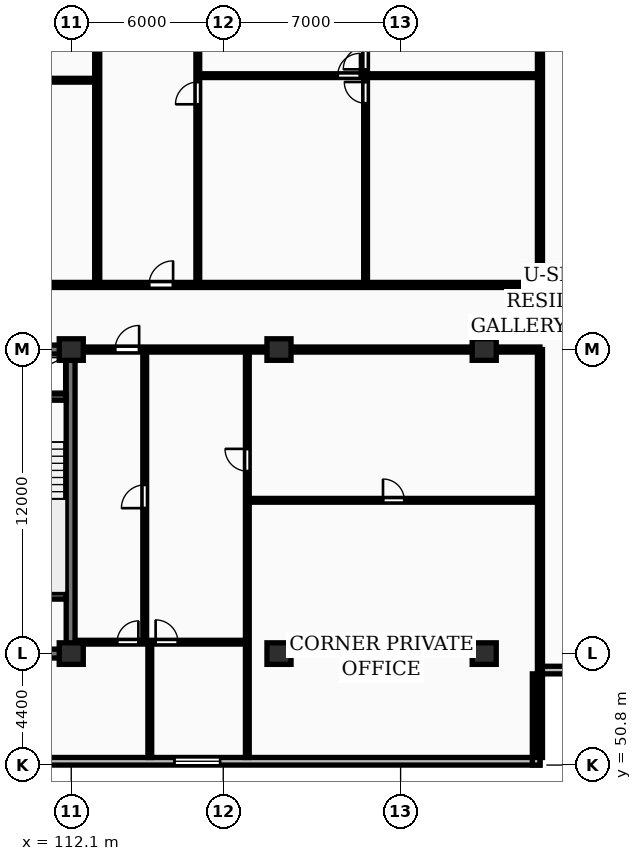
"""IFC4 building model, lengths in metres.
Left out: names, types, materials, properties, quantities, classifications, styles, units other than length and angle.
Written with IfcOpenShell. Run it as: python <this file> out.ifc"""

import sys

from ifc_helpers import new_model, si_unit, direction, frame, frame_2d, origin, origin_2d, place, context, subcontext, project, spatial, rectangle, extrude, element, fill, save


model = new_model("IFC4")
c1 = context("Model", 3, precision=1e-05, world=origin(), true_north=direction((0.0, 1.0)))
c2 = subcontext(c1, "Body", "Model", "MODEL_VIEW")
j1 = project(units=[si_unit("LENGTHUNIT", "METRE"), si_unit("PLANEANGLEUNIT", "RADIAN")], contexts=[c1])
p1 = place(None, origin())
s1 = spatial("IfcSite", under=j1, at=p1, CompositionType="ELEMENT")
p2 = place(p1, origin())
s2 = spatial("IfcBuilding", under=s1, at=p2, CompositionType="ELEMENT")
p3 = place(p2, frame((0.0, 0.0, 126.3)))
s3 = spatial("IfcBuildingStorey", under=s2, at=p3, CompositionType="ELEMENT", Elevation=126.3)
for number, where, z_axis, x_axis in (
    (1, (112.1, 55.2, 0.0), (0.0, 0.0, 1.0), (1.0, 0.0, 0.0)),
    (2, (112.1, 67.2, 0.0), (0.0, 0.0, 1.0), (1.0, 0.0, 0.0)),
    (3, (120.3, 55.2, 0.0), (0.0, 0.0, 1.0), (1.0, 0.0, 0.0)),
    (4, (120.3, 67.2, 0.0), (0.0, 0.0, 1.0), (1.0, 0.0, 0.0)),
    (5, (128.4, 55.2, 0.0), (0.0, 0.0, 1.0), (1.0, 0.0, 0.0)),
    (6, (128.4, 67.2, 0.0), (0.0, 0.0, 1.0), (1.0, 0.0, 0.0)),
):
    element("IfcColumn", number, at=place(p3, frame(where, z_axis=z_axis, x_axis=x_axis)), inside=s3, PredefinedType="COLUMN", context=c2, shape_type="SweptSolid", body=[
        extrude(rectangle(XDim=0.95, YDim=0.85, at=origin_2d()), origin(), (0.0, 0.0, 1.0), 3.25),
    ])
p4 = place(p3, frame((57.6, 50.95, 0.0), z_axis=(0.0, 0.0, 1.0), x_axis=(1.0, 0.0, 0.0)))
e7 = element("IfcWall", 7, at=p4, inside=s3, PredefinedType="STANDARD", context=c2, shape_type="SweptSolid", body=[
    extrude(rectangle(XDim=73.0, YDim=0.3, at=frame_2d((36.5, 0.0))), origin(), (0.0, 0.0, 1.0), 2.97),
])
p5 = place(p4, frame((15.225, 0.0, 0.85)))
e8 = element("IfcOpeningElement", 8, at=p5, cuts=e7, PredefinedType="OPENING", context=c2, shape_type="SweptSolid", body=[
    extrude(rectangle(XDim=1.8, YDim=1.8, at=frame_2d((0.9, 0.9))), frame((0.0, 0.16, 0.0), z_axis=(0.0, -1.0, 0.0), x_axis=(1.0, 0.0, 0.0)), (0.0, 0.0, 1.0), 0.32),
])
p6 = place(p4, frame((58.575, 0.0, 0.85)))
e9 = element("IfcOpeningElement", 9, at=p6, cuts=e7, PredefinedType="OPENING", context=c2, shape_type="SweptSolid", body=[
    extrude(rectangle(XDim=1.8, YDim=1.8, at=frame_2d((0.9, 0.9))), frame((0.0, 0.16, 0.0), z_axis=(0.0, -1.0, 0.0), x_axis=(1.0, 0.0, 0.0)), (0.0, 0.0, 1.0), 0.32),
])
for number, where, z_axis, x_axis in (
    (10, (130.45, 50.8, 0.0), (0.0, 0.0, 1.0), (0.0, 1.0, 0.0)),
    (11, (130.6, 54.55, 0.0), (0.0, 0.0, 1.0), (1.0, 0.0, 0.0)),
):
    element("IfcWall", number, at=place(p3, frame(where, z_axis=z_axis, x_axis=x_axis)), inside=s3, PredefinedType="STANDARD", context=c2, shape_type="SweptSolid", body=[
        extrude(rectangle(XDim=3.6, YDim=0.3, at=frame_2d((1.8, 0.0))), origin(), (0.0, 0.0, 1.0), 2.97),
    ])
p7 = place(p3, frame((75.95, 55.2, 0.0), z_axis=(0.0, 0.0, 1.0), x_axis=(1.0, 0.0, 0.0)))
e12 = element("IfcWall", 12, at=p7, inside=s3, PredefinedType="SHEAR", context=c2, shape_type="SweptSolid", body=[
    extrude(rectangle(XDim=36.3, YDim=0.35, at=frame_2d((18.15, 0.0))), origin(), (0.0, 0.0, 1.0), 3.25),
])
p8 = place(p3, frame((112.075, 55.375, 0.0), z_axis=(0.0, 0.0, 1.0), x_axis=(0.0, 1.0, 0.0)))
e13 = element("IfcWall", 13, at=p8, inside=s3, PredefinedType="SHEAR", context=c2, shape_type="SweptSolid", body=[
    extrude(rectangle(XDim=11.65, YDim=0.35, at=frame_2d((5.825, 0.0))), origin(), (0.0, 0.0, 1.0), 3.25),
])
p9 = place(p3, frame((75.95, 67.2, 0.0), z_axis=(0.0, 0.0, 1.0), x_axis=(1.0, 0.0, 0.0)))
e14 = element("IfcWall", 14, at=p9, inside=s3, PredefinedType="SHEAR", context=c2, shape_type="SweptSolid", body=[
    extrude(rectangle(XDim=36.3, YDim=0.35, at=frame_2d((18.15, 0.0))), origin(), (0.0, 0.0, 1.0), 3.25),
])
p10 = place(p9, frame((5.25, 0.0, 0.0)))
e15 = element("IfcOpeningElement", 15, at=p10, cuts=e14, PredefinedType="OPENING", context=c2, shape_type="SweptSolid", body=[
    extrude(rectangle(XDim=1.0, YDim=2.15, at=frame_2d((0.5, 1.075))), frame((0.0, 0.185, 0.0), z_axis=(0.0, -1.0, 0.0), x_axis=(1.0, 0.0, 0.0)), (0.0, 0.0, 1.0), 0.37),
])
p11 = place(p9, frame((21.6, 0.0, 0.0)))
e16 = element("IfcOpeningElement", 16, at=p11, cuts=e14, PredefinedType="OPENING", context=c2, shape_type="SweptSolid", body=[
    extrude(rectangle(XDim=1.5, YDim=2.2, at=frame_2d((0.75, 1.1))), frame((0.0, 0.185, 0.0), z_axis=(0.0, -1.0, 0.0), x_axis=(1.0, 0.0, 0.0)), (0.0, 0.0, 1.0), 0.37),
])
p12 = place(p9, frame((30.45, 0.0, 0.0)))
e17 = element("IfcOpeningElement", 17, at=p12, cuts=e14, PredefinedType="OPENING", context=c2, shape_type="SweptSolid", body=[
    extrude(rectangle(XDim=1.0, YDim=2.15, at=frame_2d((0.5, 1.075))), frame((0.0, 0.185, 0.0), z_axis=(0.0, -1.0, 0.0), x_axis=(1.0, 0.0, 0.0)), (0.0, 0.0, 1.0), 0.37),
])
for number, where, z_axis, x_axis in (
    (18, (108.66, 57.475, 0.0), (0.0, 0.0, 1.0), (1.0, 0.0, 0.0)),
    (19, (108.66, 65.325, 0.0), (0.0, 0.0, 1.0), (1.0, 0.0, 0.0)),
):
    element("IfcWall", number, at=place(p3, frame(where, z_axis=z_axis, x_axis=x_axis)), inside=s3, PredefinedType="SHEAR", context=c2, shape_type="SweptSolid", body=[
        extrude(rectangle(XDim=3.24, YDim=0.25, at=frame_2d((1.62, 0.0))), origin(), (0.0, 0.0, 1.0), 3.25),
    ])
p13 = place(p3, frame((130.6, 51.1, 0.0), z_axis=(0.0, 0.0, 1.0), x_axis=(0.0, 1.0, 0.0)))
e20 = element("IfcWall", 20, at=p13, inside=s3, PredefinedType="PARTITIONING", context=c2, shape_type="SweptSolid", body=[
    extrude(rectangle(XDim=16.1, YDim=0.2, at=frame_2d((8.05, 0.0))), origin(), (0.0, 0.0, 1.0), 2.97),
])
p14 = place(p3, frame((119.05, 61.25, 0.0), z_axis=(0.0, 0.0, 1.0), x_axis=(1.0, 0.0, 0.0)))
e21 = element("IfcWall", 21, at=p14, inside=s3, PredefinedType="PARTITIONING", context=c2, shape_type="SweptSolid", body=[
    extrude(rectangle(XDim=11.55, YDim=0.15, at=frame_2d((5.775, 0.0))), origin(), (0.0, 0.0, 1.0), 2.97),
])
p15 = place(p14, frame((5.355, 0.0, 0.0)))
e22 = element("IfcOpeningElement", 22, at=p15, cuts=e21, PredefinedType="OPENING", context=c2, shape_type="SweptSolid", body=[
    extrude(rectangle(XDim=0.84, YDim=2.04, at=frame_2d((0.42, 1.02))), frame((0.0, 0.085, 0.0), z_axis=(0.0, -1.0, 0.0), x_axis=(1.0, 0.0, 0.0)), (0.0, 0.0, 1.0), 0.17),
])
p16 = place(p3, frame((119.05, 51.1, 0.0), z_axis=(0.0, 0.0, 1.0), x_axis=(0.0, 1.0, 0.0)))
e23 = element("IfcWall", 23, at=p16, inside=s3, PredefinedType="PARTITIONING", context=c2, shape_type="SweptSolid", body=[
    extrude(rectangle(XDim=16.05, YDim=0.15, at=frame_2d((8.025, 0.0))), origin(), (0.0, 0.0, 1.0), 2.97),
])
p17 = place(p16, frame((11.3, 0.0, 0.0)))
e24 = element("IfcOpeningElement", 24, at=p17, cuts=e23, PredefinedType="OPENING", context=c2, shape_type="SweptSolid", body=[
    extrude(rectangle(XDim=0.88, YDim=2.06, at=frame_2d((0.44, 1.03))), frame((0.0, 0.085, 0.0), z_axis=(0.0, -1.0, 0.0), x_axis=(1.0, 0.0, 0.0)), (0.0, 0.0, 1.0), 0.17),
])
p18 = place(p3, frame((115.0, 55.65, 0.0), z_axis=(0.0, 0.0, 1.0), x_axis=(0.0, 1.0, 0.0)))
e25 = element("IfcWall", 25, at=p18, inside=s3, PredefinedType="PARTITIONING", context=c2, shape_type="SweptSolid", body=[
    extrude(rectangle(XDim=11.5, YDim=0.15, at=frame_2d((5.75, 0.0))), origin(), (0.0, 0.0, 1.0), 2.97),
])
p19 = place(p18, frame((5.29, 0.0, 0.0)))
e26 = element("IfcOpeningElement", 26, at=p19, cuts=e25, PredefinedType="OPENING", context=c2, shape_type="SweptSolid", body=[
    extrude(rectangle(XDim=0.92, YDim=2.08, at=frame_2d((0.46, 1.04))), frame((0.0, 0.085, 0.0), z_axis=(0.0, -1.0, 0.0), x_axis=(1.0, 0.0, 0.0)), (0.0, 0.0, 1.0), 0.17),
])
p20 = place(p3, frame((115.2, 51.1, 0.0), z_axis=(0.0, 0.0, 1.0), x_axis=(0.0, 1.0, 0.0)))
e27 = element("IfcWall", 27, at=p20, inside=s3, PredefinedType="PARTITIONING", context=c2, shape_type="SweptSolid", body=[
    extrude(rectangle(XDim=4.55, YDim=0.15, at=frame_2d((2.275, 0.0))), origin(), (0.0, 0.0, 1.0), 2.97),
])
p21 = place(p3, frame((112.27, 55.65, 0.0), z_axis=(0.0, 0.0, 1.0), x_axis=(1.0, 0.0, 0.0)))
e28 = element("IfcWall", 28, at=p21, inside=s3, PredefinedType="PARTITIONING", context=c2, shape_type="SweptSolid", body=[
    extrude(rectangle(XDim=6.76, YDim=0.15, at=frame_2d((3.38, 0.0))), origin(), (0.0, 0.0, 1.0), 2.97),
])
p22 = place(p21, frame((1.64, 0.0, 0.0)))
e29 = element("IfcOpeningElement", 29, at=p22, cuts=e28, PredefinedType="OPENING", context=c2, shape_type="SweptSolid", body=[
    extrude(rectangle(XDim=0.84, YDim=2.04, at=frame_2d((0.42, 1.02))), frame((0.0, 0.085, 0.0), z_axis=(0.0, -1.0, 0.0), x_axis=(1.0, 0.0, 0.0)), (0.0, 0.0, 1.0), 0.17),
])
p23 = place(p21, frame((3.16, 0.0, 0.0)))
e30 = element("IfcOpeningElement", 30, at=p23, cuts=e28, PredefinedType="OPENING", context=c2, shape_type="SweptSolid", body=[
    extrude(rectangle(XDim=0.88, YDim=2.06, at=frame_2d((0.44, 1.03))), frame((0.0, 0.085, 0.0), z_axis=(0.0, -1.0, 0.0), x_axis=(1.0, 0.0, 0.0)), (0.0, 0.0, 1.0), 0.17),
])
p24 = place(p3, frame((112.25, 67.2, 0.0), z_axis=(0.0, 0.0, 1.0), x_axis=(1.0, 0.0, 0.0)))
e31 = element("IfcWall", 31, at=p24, inside=s3, PredefinedType="PARTITIONING", context=c2, shape_type="SweptSolid", body=[
    extrude(rectangle(XDim=18.35, YDim=0.2, at=frame_2d((9.175, 0.0))), origin(), (0.0, 0.0, 1.0), 2.433),
])
p25 = place(p24, frame((1.58, 0.0, 0.0)))
e32 = element("IfcOpeningElement", 32, at=p25, cuts=e31, PredefinedType="OPENING", context=c2, shape_type="SweptSolid", body=[
    extrude(rectangle(XDim=0.95, YDim=2.15, at=frame_2d((0.475, 1.075))), frame((0.0, 0.11, 0.0), z_axis=(0.0, -1.0, 0.0), x_axis=(1.0, 0.0, 0.0)), (0.0, 0.0, 1.0), 0.22),
])
for number, where, z_axis, x_axis in (
    (33, (130.6, 69.83, 0.0), (0.0, 0.0, 1.0), (0.0, 1.0, 0.0)),
    (34, (113.125, 69.83, 0.0), (0.0, 0.0, 1.0), (0.0, 1.0, 0.0)),
):
    element("IfcWall", number, at=place(p3, frame(where, z_axis=z_axis, x_axis=x_axis)), inside=s3, PredefinedType="PARTITIONING", context=c2, shape_type="SweptSolid", body=[
        extrude(rectangle(XDim=26.07, YDim=0.2, at=frame_2d((13.035, 0.0))), origin(), (0.0, 0.0, 1.0), 2.97),
    ])
p26 = place(p3, frame((96.867, 77.83, 0.0), z_axis=(0.0, 0.0, 1.0), x_axis=(1.0, 0.0, 0.0)))
e35 = element("IfcWall", 35, at=p26, inside=s3, PredefinedType="PARTITIONING", context=c2, shape_type="SweptSolid", body=[
    extrude(rectangle(XDim=16.177, YDim=0.15, at=frame_2d((8.089, 0.0))), origin(), (0.0, 0.0, 1.0), 2.97),
])
p27 = place(p26, frame((3.45, 0.0, 0.0)))
e36 = element("IfcOpeningElement", 36, at=p27, cuts=e35, PredefinedType="OPENING", context=c2, shape_type="SweptSolid", body=[
    extrude(rectangle(XDim=0.88, YDim=2.06, at=frame_2d((0.44, 1.03))), frame((0.0, 0.085, 0.0), z_axis=(0.0, -1.0, 0.0), x_axis=(1.0, 0.0, 0.0)), (0.0, 0.0, 1.0), 0.17),
])
p28 = place(p3, frame((123.718, 69.81, 0.0), z_axis=(0.0, 0.0, 1.0), x_axis=(0.0, 1.0, 0.0)))
e37 = element("IfcWall", 37, at=p28, inside=s3, PredefinedType="PARTITIONING", context=c2, shape_type="SweptSolid", body=[
    extrude(rectangle(XDim=16.4, YDim=0.15, at=frame_2d((8.2, 0.0))), origin(), (0.0, 0.0, 1.0), 2.97),
])
p29 = place(p28, frame((7.11, 0.0, 0.0)))
e38 = element("IfcOpeningElement", 38, at=p29, cuts=e37, PredefinedType="OPENING", context=c2, shape_type="SweptSolid", body=[
    extrude(rectangle(XDim=0.84, YDim=2.04, at=frame_2d((0.42, 1.02))), frame((0.0, 0.085, 0.0), z_axis=(0.0, -1.0, 0.0), x_axis=(1.0, 0.0, 0.0)), (0.0, 0.0, 1.0), 0.17),
])
p30 = place(p28, frame((8.45, 0.0, 0.0)))
e39 = element("IfcOpeningElement", 39, at=p30, cuts=e37, PredefinedType="OPENING", context=c2, shape_type="SweptSolid", body=[
    extrude(rectangle(XDim=0.88, YDim=2.06, at=frame_2d((0.44, 1.03))), frame((0.0, 0.085, 0.0), z_axis=(0.0, -1.0, 0.0), x_axis=(1.0, 0.0, 0.0)), (0.0, 0.0, 1.0), 0.17),
])
p31 = place(p3, frame((117.155, 78.01, 0.0), z_axis=(0.0, 0.0, 1.0), x_axis=(1.0, 0.0, 0.0)))
e40 = element("IfcWall", 40, at=p31, inside=s3, PredefinedType="PARTITIONING", context=c2, shape_type="SweptSolid", body=[
    extrude(rectangle(XDim=13.365, YDim=0.15, at=frame_2d((6.683, 0.0))), origin(), (0.0, 0.0, 1.0), 2.97),
])
p32 = place(p31, frame((5.462, 0.0, 0.0)))
e41 = element("IfcOpeningElement", 41, at=p32, cuts=e40, PredefinedType="OPENING", context=c2, shape_type="SweptSolid", body=[
    extrude(rectangle(XDim=0.88, YDim=2.06, at=frame_2d((0.44, 1.03))), frame((0.0, 0.085, 0.0), z_axis=(0.0, -1.0, 0.0), x_axis=(1.0, 0.0, 0.0)), (0.0, 0.0, 1.0), 0.17),
])
p33 = place(p3, frame((117.095, 69.81, 0.0), z_axis=(0.0, 0.0, 1.0), x_axis=(0.0, 1.0, 0.0)))
e42 = element("IfcWall", 42, at=p33, inside=s3, PredefinedType="PARTITIONING", context=c2, shape_type="SweptSolid", body=[
    extrude(rectangle(XDim=16.4, YDim=0.15, at=frame_2d((8.2, 0.0))), origin(), (0.0, 0.0, 1.0), 2.97),
])
p34 = place(p33, frame((7.07, 0.0, 0.0)))
e43 = element("IfcOpeningElement", 43, at=p34, cuts=e42, PredefinedType="OPENING", context=c2, shape_type="SweptSolid", body=[
    extrude(rectangle(XDim=0.88, YDim=2.06, at=frame_2d((0.44, 1.03))), frame((0.0, 0.085, 0.0), z_axis=(0.0, -1.0, 0.0), x_axis=(1.0, 0.0, 0.0)), (0.0, 0.0, 1.0), 0.17),
])
p35 = place(p3, frame((57.6, 69.75, 0.0), z_axis=(0.0, 0.0, 1.0), x_axis=(1.0, 0.0, 0.0)))
e44 = element("IfcWall", 44, at=p35, inside=s3, PredefinedType="PARTITIONING", context=c2, shape_type="SweptSolid", body=[
    extrude(rectangle(XDim=73.0, YDim=0.2, at=frame_2d((36.5, 0.0))), origin(), (0.0, 0.0, 1.0), 2.97),
])
p36 = place(p35, frame((6.629, 0.0, 0.0)))
e45 = element("IfcOpeningElement", 45, at=p36, cuts=e44, PredefinedType="OPENING", context=c2, shape_type="SweptSolid", body=[
    extrude(rectangle(XDim=1.22, YDim=2.18, at=frame_2d((0.61, 1.09))), frame((0.0, 0.11, 0.0), z_axis=(0.0, -1.0, 0.0), x_axis=(1.0, 0.0, 0.0)), (0.0, 0.0, 1.0), 0.22),
])
p37 = place(p35, frame((24.022, 0.0, 0.0)))
e46 = element("IfcOpeningElement", 46, at=p37, cuts=e44, PredefinedType="OPENING", context=c2, shape_type="SweptSolid", body=[
    extrude(rectangle(XDim=1.22, YDim=2.18, at=frame_2d((0.61, 1.09))), frame((0.0, 0.11, 0.0), z_axis=(0.0, -1.0, 0.0), x_axis=(1.0, 0.0, 0.0)), (0.0, 0.0, 1.0), 0.22),
])
p38 = place(p35, frame((37.768, 0.0, 0.0)))
e47 = element("IfcOpeningElement", 47, at=p38, cuts=e44, PredefinedType="OPENING", context=c2, shape_type="SweptSolid", body=[
    extrude(rectangle(XDim=0.95, YDim=2.15, at=frame_2d((0.475, 1.075))), frame((0.0, 0.11, 0.0), z_axis=(0.0, -1.0, 0.0), x_axis=(1.0, 0.0, 0.0)), (0.0, 0.0, 1.0), 0.22),
])
p39 = place(p35, frame((57.57, 0.0, 0.0)))
e48 = element("IfcOpeningElement", 48, at=p39, cuts=e44, PredefinedType="OPENING", context=c2, shape_type="SweptSolid", body=[
    extrude(rectangle(XDim=0.95, YDim=2.15, at=frame_2d((0.475, 1.075))), frame((0.0, 0.11, 0.0), z_axis=(0.0, -1.0, 0.0), x_axis=(1.0, 0.0, 0.0)), (0.0, 0.0, 1.0), 0.22),
])
p40 = place(p6, origin())
e49 = element("IfcWindow", 49, at=p40, inside=s3, PartitioningType="SINGLE_PANEL", PredefinedType="WINDOW", context=c2, shape_type="SweptSolid", body=[
    extrude(rectangle(XDim=1.8, YDim=1.8, at=frame_2d((0.9, 0.9))), frame((0.0, 0.03, 0.0), z_axis=(0.0, -1.0, 0.0), x_axis=(1.0, 0.0, 0.0)), (0.0, 0.0, 1.0), 0.06),
])
fill(e9, e49)
p41 = place(p15, origin())
e50 = element("IfcDoor", 50, at=p41, inside=s3, OperationType="SINGLE_SWING_LEFT", PredefinedType="DOOR", context=c2, shape_type="SweptSolid", body=[
    extrude(rectangle(XDim=0.84, YDim=2.04, at=frame_2d((0.42, 1.02))), frame((0.0, 0.025, 0.0), z_axis=(0.0, -1.0, 0.0), x_axis=(1.0, 0.0, 0.0)), (0.0, 0.0, 1.0), 0.05),
])
fill(e22, e50)
p42 = place(p17, origin())
e51 = element("IfcDoor", 51, at=p42, inside=s3, OperationType="SINGLE_SWING_RIGHT", PredefinedType="DOOR", context=c2, shape_type="SweptSolid", body=[
    extrude(rectangle(XDim=0.88, YDim=2.06, at=frame_2d((0.44, 1.03))), frame((0.0, 0.025, 0.0), z_axis=(0.0, -1.0, 0.0), x_axis=(1.0, 0.0, 0.0)), (0.0, 0.0, 1.0), 0.05),
])
fill(e24, e51)
p43 = place(p19, origin())
e52 = element("IfcDoor", 52, at=p43, inside=s3, OperationType="SINGLE_SWING_LEFT", PredefinedType="DOOR", context=c2, shape_type="SweptSolid", body=[
    extrude(rectangle(XDim=0.92, YDim=2.08, at=frame_2d((0.46, 1.04))), frame((0.0, 0.025, 0.0), z_axis=(0.0, -1.0, 0.0), x_axis=(1.0, 0.0, 0.0)), (0.0, 0.0, 1.0), 0.05),
])
fill(e26, e52)
p44 = place(p22, origin())
e53 = element("IfcDoor", 53, at=p44, inside=s3, OperationType="SINGLE_SWING_RIGHT", PredefinedType="DOOR", context=c2, shape_type="SweptSolid", body=[
    extrude(rectangle(XDim=0.84, YDim=2.04, at=frame_2d((0.42, 1.02))), frame((0.0, 0.025, 0.0), z_axis=(0.0, -1.0, 0.0), x_axis=(1.0, 0.0, 0.0)), (0.0, 0.0, 1.0), 0.05),
])
fill(e29, e53)
p45 = place(p23, origin())
e54 = element("IfcDoor", 54, at=p45, inside=s3, OperationType="SINGLE_SWING_LEFT", PredefinedType="DOOR", context=c2, shape_type="SweptSolid", body=[
    extrude(rectangle(XDim=0.88, YDim=2.06, at=frame_2d((0.44, 1.03))), frame((0.0, 0.025, 0.0), z_axis=(0.0, -1.0, 0.0), x_axis=(1.0, 0.0, 0.0)), (0.0, 0.0, 1.0), 0.05),
])
fill(e30, e54)
p46 = place(p25, origin())
e55 = element("IfcDoor", 55, at=p46, inside=s3, OperationType="SINGLE_SWING_RIGHT", PredefinedType="DOOR", context=c2, shape_type="SweptSolid", body=[
    extrude(rectangle(XDim=0.95, YDim=2.15, at=frame_2d((0.475, 1.075))), frame((0.0, 0.025, 0.0), z_axis=(0.0, -1.0, 0.0), x_axis=(1.0, 0.0, 0.0)), (0.0, 0.0, 1.0), 0.05),
])
fill(e32, e55)
p47 = place(p29, origin())
e56 = element("IfcDoor", 56, at=p47, inside=s3, OperationType="SINGLE_SWING_RIGHT", PredefinedType="DOOR", context=c2, shape_type="SweptSolid", body=[
    extrude(rectangle(XDim=0.84, YDim=2.04, at=frame_2d((0.42, 1.02))), frame((0.0, 0.025, 0.0), z_axis=(0.0, -1.0, 0.0), x_axis=(1.0, 0.0, 0.0)), (0.0, 0.0, 1.0), 0.05),
])
fill(e38, e56)
p48 = place(p30, origin())
e57 = element("IfcDoor", 57, at=p48, inside=s3, OperationType="SINGLE_SWING_LEFT", PredefinedType="DOOR", context=c2, shape_type="SweptSolid", body=[
    extrude(rectangle(XDim=0.88, YDim=2.06, at=frame_2d((0.44, 1.03))), frame((0.0, 0.025, 0.0), z_axis=(0.0, -1.0, 0.0), x_axis=(1.0, 0.0, 0.0)), (0.0, 0.0, 1.0), 0.05),
])
fill(e39, e57)
p49 = place(p32, origin())
e58 = element("IfcDoor", 58, at=p49, inside=s3, OperationType="SINGLE_SWING_RIGHT", PredefinedType="DOOR", context=c2, shape_type="SweptSolid", body=[
    extrude(rectangle(XDim=0.88, YDim=2.06, at=frame_2d((0.44, 1.03))), frame((0.0, 0.025, 0.0), z_axis=(0.0, -1.0, 0.0), x_axis=(1.0, 0.0, 0.0)), (0.0, 0.0, 1.0), 0.05),
])
fill(e41, e58)
p50 = place(p34, origin())
e59 = element("IfcDoor", 59, at=p50, inside=s3, OperationType="SINGLE_SWING_LEFT", PredefinedType="DOOR", context=c2, shape_type="SweptSolid", body=[
    extrude(rectangle(XDim=0.88, YDim=2.06, at=frame_2d((0.44, 1.03))), frame((0.0, 0.025, 0.0), z_axis=(0.0, -1.0, 0.0), x_axis=(1.0, 0.0, 0.0)), (0.0, 0.0, 1.0), 0.05),
])
fill(e43, e59)
p51 = place(p39, origin())
e60 = element("IfcDoor", 60, at=p51, inside=s3, OperationType="SINGLE_SWING_RIGHT", PredefinedType="DOOR", context=c2, shape_type="SweptSolid", body=[
    extrude(rectangle(XDim=0.95, YDim=2.15, at=frame_2d((0.475, 1.075))), frame((0.0, 0.025, 0.0), z_axis=(0.0, -1.0, 0.0), x_axis=(1.0, 0.0, 0.0)), (0.0, 0.0, 1.0), 0.05),
])
fill(e48, e60)
save(model, sys.argv[1])
